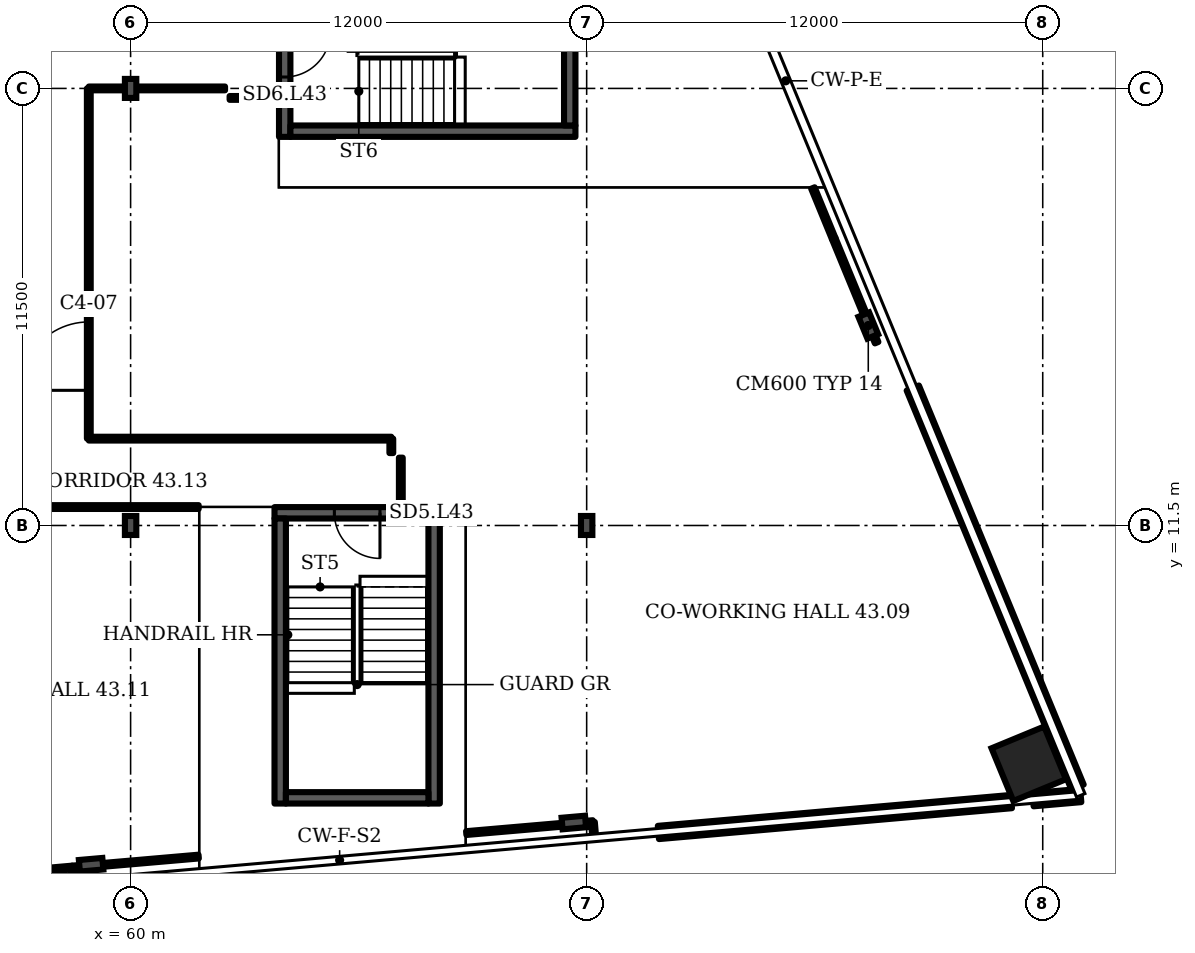
"""IFC4 building model, lengths in metres.
Left out: names, types, materials, properties, quantities, classifications, styles, units other than length and angle.
Written with IfcOpenShell. Run it as: python <this file> out.ifc"""

import sys

from ifc_helpers import new_model, si_unit, direction, frame, frame_2d, origin, origin_2d, place, context, subcontext, project, spatial, rectangle, i_section, extrude, element, fill, save


model = new_model("IFC4")
c1 = context("Model", 3, precision=1e-05, world=origin(), true_north=direction((0.0, 1.0)))
c2 = subcontext(c1, "Body", "Model", "MODEL_VIEW")
j1 = project(units=[si_unit("LENGTHUNIT", "METRE"), si_unit("PLANEANGLEUNIT", "RADIAN")], contexts=[c1])
p1 = place(None, origin())
s1 = spatial("IfcSite", under=j1, at=p1, CompositionType="ELEMENT")
p2 = place(p1, origin())
s2 = spatial("IfcBuilding", under=s1, at=p2, CompositionType="ELEMENT")
p3 = place(p2, frame((0.0, 0.0, 177.1)))
s3 = spatial("IfcBuildingStorey", under=s2, at=p3, CompositionType="ELEMENT", Elevation=177.1)
p4 = place(p3, frame((83.633, 5.231, 0.0), z_axis=(0.0, 0.0, 1.0), x_axis=(-0.381602, 0.924325, 0.0)))
e1 = element("IfcColumn", 1, at=p4, inside=s3, PredefinedType="COLUMN", context=c2, shape_type="SweptSolid", body=[
    extrude(rectangle(XDim=1.5, YDim=1.5, at=origin_2d()), origin(), (0.0, 0.0, 1.0), 3.6),
])
for number, where, z_axis, x_axis in (
    (2, (58.961, 2.573, 0.0), (0.0, 0.0, 1.0), (0.087, -0.996, 0.0)),
    (3, (71.662, 3.685, 0.0), (0.0, 0.0, 1.0), (0.087, -0.996, 0.0)),
    (4, (79.41, 16.762, 0.0), (0.0, 0.0, 1.0), (0.924, 0.382, 0.0)),
):
    element("IfcColumn", number, at=place(p3, frame(where, z_axis=z_axis, x_axis=x_axis)), inside=s3, PredefinedType="COLUMN", context=c2, shape_type="SweptSolid", body=[
        extrude(i_section(OverallWidth=0.305, OverallDepth=0.62, WebThickness=0.021, FlangeThickness=0.04, FilletRadius=0.027, at=origin_2d()), origin(), (0.0, 0.0, 1.0), 3.6),
    ])
for number, where, z_axis, x_axis in (
    (5, (60.0, 11.5, 0.0), (0.0, 0.0, 1.0), (1.0, 0.0, 0.0)),
    (6, (72.0, 11.5, 0.0), (0.0, 0.0, 1.0), (1.0, 0.0, 0.0)),
    (7, (60.0, 23.0, 0.0), (0.0, 0.0, 1.0), (1.0, 0.0, 0.0)),
):
    element("IfcColumn", number, at=place(p3, frame(where, z_axis=z_axis, x_axis=x_axis)), inside=s3, PredefinedType="COLUMN", context=c2, shape_type="SweptSolid", body=[
        extrude(i_section(OverallWidth=0.3, OverallDepth=0.5, WebThickness=0.014, FlangeThickness=0.028, FilletRadius=0.027, at=origin_2d()), origin(), (0.0, 0.0, 1.0), 3.6),
    ])
p5 = place(p3, frame((73.887, 3.423, 0.0), z_axis=(0.0, 0.0, 1.0), x_axis=(0.996197, 0.087145, 0.0)))
e8 = element("IfcWall", 8, at=p5, inside=s3, PredefinedType="SOLIDWALL", context=c2, shape_type="SweptSolid", body=[
    extrude(rectangle(XDim=9.323, YDim=0.35, at=frame_2d((4.662, 0.0))), origin(), (0.0, 0.0, 1.0), 1.0),
])
p6 = place(p3, frame((83.745, 4.285, 0.0), z_axis=(0.0, 0.0, 1.0), x_axis=(0.996198, 0.087148, 0.0)))
e9 = element("IfcWall", 9, at=p6, inside=s3, PredefinedType="SOLIDWALL", context=c2, shape_type="SweptSolid", body=[
    extrude(rectangle(XDim=1.261, YDim=0.35, at=frame_2d((0.63, 0.0))), origin(), (0.0, 0.0, 1.0), 1.0),
])
p7 = place(p3, frame((84.916, 4.616, 0.0), z_axis=(0.0, 0.0, 1.0), x_axis=(-0.381598, 0.924328, 0.0)))
e10 = element("IfcWall", 10, at=p7, inside=s3, PredefinedType="SOLIDWALL", context=c2, shape_type="SweptSolid", body=[
    extrude(rectangle(XDim=11.361, YDim=0.35, at=frame_2d((5.68, 0.0))), origin(), (0.0, 0.0, 1.0), 1.0),
])
p8 = place(p3, frame((63.786, 11.834, 0.0), z_axis=(0.0, 0.0, 1.0), x_axis=(1.0, 0.0, 0.0)))
e11 = element("IfcWall", 11, at=p8, inside=s3, PredefinedType="SHEAR", context=c2, shape_type="SweptSolid", body=[
    extrude(rectangle(XDim=4.35, YDim=0.3, at=frame_2d((2.175, 0.0))), origin(), (0.0, 0.0, 1.0), 3.2),
])
p9 = place(p8, frame((1.575, 0.0, 0.0)))
e12 = element("IfcOpeningElement", 12, at=p9, cuts=e11, PredefinedType="OPENING", context=c2, shape_type="SweptSolid", body=[
    extrude(rectangle(XDim=1.2, YDim=2.1, at=frame_2d((0.6, 1.05))), frame((0.0, 0.16, 0.0), z_axis=(0.0, -1.0, 0.0), x_axis=(1.0, 0.0, 0.0)), (0.0, 0.0, 1.0), 0.32),
])
p10 = place(p3, frame((64.055, 21.725, 0.0), z_axis=(0.0, 0.0, 1.0), x_axis=(0.0, 1.0, 0.0)))
e13 = element("IfcWall", 13, at=p10, inside=s3, PredefinedType="SHEAR", context=c2, shape_type="SweptSolid", body=[
    extrude(rectangle(XDim=4.35, YDim=0.3, at=frame_2d((2.175, 0.0))), origin(), (0.0, 0.0, 1.0), 3.2),
])
p11 = place(p10, frame((1.575, 0.0, 0.0)))
e14 = element("IfcOpeningElement", 14, at=p11, cuts=e13, PredefinedType="OPENING", context=c2, shape_type="SweptSolid", body=[
    extrude(rectangle(XDim=1.2, YDim=2.1, at=frame_2d((0.6, 1.05))), frame((0.0, 0.16, 0.0), z_axis=(0.0, -1.0, 0.0), x_axis=(1.0, 0.0, 0.0)), (0.0, 0.0, 1.0), 0.32),
])
p12 = place(p3, frame((52.5, 1.975, 0.0), z_axis=(0.0, 0.0, 1.0), x_axis=(0.99615, 0.087657, 0.0)))
e15 = element("IfcWall", 15, at=p12, inside=s3, PredefinedType="PARTITIONING", context=c2, shape_type="SweptSolid", body=[
    extrude(rectangle(XDim=5.988, YDim=0.1, at=frame_2d((2.994, 0.0))), origin(), (0.0, 0.0, 1.0), 3.2),
])
p13 = place(p3, frame((57.1, 11.985, 0.0), z_axis=(0.0, 0.0, 1.0), x_axis=(1.0, 0.0, 0.0)))
e16 = element("IfcWall", 16, at=p13, inside=s3, PredefinedType="PARTITIONING", context=c2, shape_type="SweptSolid", body=[
    extrude(rectangle(XDim=4.691, YDim=0.1, at=frame_2d((2.346, 0.0))), origin(), (0.0, 0.0, 1.0), 3.2),
])
p14 = place(p3, frame((58.465, 2.5, 0.0), z_axis=(0.0, 0.0, 1.0), x_axis=(0.996263, 0.086355, 0.0)))
e17 = element("IfcWall", 17, at=p14, inside=s3, PredefinedType="PARTITIONING", context=c2, shape_type="SweptSolid", body=[
    extrude(rectangle(XDim=3.339, YDim=0.1, at=frame_2d((1.669, 0.0))), origin(), (0.0, 0.0, 1.0), 2.58),
])
p15 = place(p3, frame((58.498, 2.102, 0.0), z_axis=(0.0, 0.0, 1.0), x_axis=(-0.083045, 0.996542, 0.0)))
e18 = element("IfcWall", 18, at=p15, inside=s3, PredefinedType="PARTITIONING", context=c2, shape_type="SweptSolid", body=[
    extrude(rectangle(XDim=0.4, YDim=0.1, at=frame_2d((0.2, 0.0))), origin(), (0.0, 0.0, 1.0), 3.2),
])
p16 = place(p3, frame((58.9, 13.785, 0.0), z_axis=(0.0, 0.0, 1.0), x_axis=(0.0, 1.0, 0.0)))
e19 = element("IfcWall", 19, at=p16, inside=s3, PredefinedType="PARTITIONING", context=c2, shape_type="SweptSolid", body=[
    extrude(rectangle(XDim=9.215, YDim=0.1, at=frame_2d((4.607, 0.0))), origin(), (0.0, 0.0, 1.0), 3.2),
])
p17 = place(p16, frame((1.271, 0.0, 0.0)))
e20 = element("IfcOpeningElement", 20, at=p17, cuts=e19, PredefinedType="OPENING", context=c2, shape_type="SweptSolid", body=[
    extrude(rectangle(XDim=1.8, YDim=2.1, at=frame_2d((0.9, 1.05))), frame((0.0, 0.06, 0.0), z_axis=(0.0, -1.0, 0.0), x_axis=(1.0, 0.0, 0.0)), (0.0, 0.0, 1.0), 0.12),
])
p18 = place(p3, frame((58.9, 13.785, 0.0), z_axis=(0.0, 0.0, 1.0), x_axis=(1.0, 0.0, 0.0)))
e21 = element("IfcWall", 21, at=p18, inside=s3, PredefinedType="PARTITIONING", context=c2, shape_type="SweptSolid", body=[
    extrude(rectangle(XDim=7.96, YDim=0.1, at=frame_2d((3.98, 0.0))), origin(), (0.0, 0.0, 1.0), 3.2),
])
p19 = place(p3, frame((58.9, 23.0, 0.0), z_axis=(0.0, 0.0, 1.0), x_axis=(1.0, 0.0, 0.0)))
e22 = element("IfcWall", 22, at=p19, inside=s3, PredefinedType="PARTITIONING", context=c2, shape_type="SweptSolid", body=[
    extrude(rectangle(XDim=3.585, YDim=0.1, at=frame_2d((1.792, 0.0))), origin(), (0.0, 0.0, 1.0), 3.2),
])
p20 = place(p3, frame((62.605, 22.75, 0.0), z_axis=(0.0, 0.0, 1.0), x_axis=(1.0, 0.0, 0.0)))
e23 = element("IfcWall", 23, at=p20, inside=s3, PredefinedType="PARTITIONING", context=c2, shape_type="SweptSolid", body=[
    extrude(rectangle(XDim=1.28, YDim=0.1, at=frame_2d((0.64, 0.0))), origin(), (0.0, 0.0, 1.0), 3.2),
])
p21 = place(p3, frame((66.86, 13.405, 0.0), z_axis=(0.0, 0.0, 1.0), x_axis=(0.0, 1.0, 0.0)))
e24 = element("IfcWall", 24, at=p21, inside=s3, PredefinedType="PARTITIONING", context=c2, shape_type="SweptSolid", body=[
    extrude(rectangle(XDim=0.38, YDim=0.1, at=frame_2d((0.19, 0.0))), origin(), (0.0, 0.0, 1.0), 3.2),
])
p22 = place(p3, frame((67.11, 12.004, 0.0), z_axis=(0.0, 0.0, 1.0), x_axis=(0.0, 1.0, 0.0)))
e25 = element("IfcWall", 25, at=p22, inside=s3, PredefinedType="PARTITIONING", context=c2, shape_type="SweptSolid", body=[
    extrude(rectangle(XDim=1.281, YDim=0.1, at=frame_2d((0.641, 0.0))), origin(), (0.0, 0.0, 1.0), 3.2),
])
p23 = place(p3, frame((68.831, 3.407, 0.0), z_axis=(0.0, 0.0, 1.0), x_axis=(0.996283, 0.086167, 0.0)))
e26 = element("IfcWall", 26, at=p23, inside=s3, PredefinedType="PARTITIONING", context=c2, shape_type="SweptSolid", body=[
    extrude(rectangle(XDim=3.346, YDim=0.1, at=frame_2d((1.673, 0.0))), origin(), (0.0, 0.0, 1.0), 2.58),
])
p24 = place(p3, frame((72.198, 3.3, 0.0), z_axis=(0.0, 0.0, 1.0), x_axis=(-0.083759, 0.996486, 0.0)))
e27 = element("IfcWall", 27, at=p24, inside=s3, PredefinedType="PARTITIONING", context=c2, shape_type="SweptSolid", body=[
    extrude(rectangle(XDim=0.396, YDim=0.1, at=frame_2d((0.198, 0.0))), origin(), (0.0, 0.0, 1.0), 3.2),
])
p25 = place(p3, frame((78.5, 19.05, 0.0), z_axis=(0.0, 0.0, 1.0), x_axis=(-0.380332, 0.924852, 0.0)))
e28 = element("IfcWall", 28, at=p25, inside=s3, PredefinedType="PARTITIONING", context=c2, shape_type="SweptSolid", body=[
    extrude(rectangle(XDim=1.438, YDim=0.1, at=frame_2d((0.719, 0.0))), origin(), (0.0, 0.0, 1.0), 2.58),
])
p26 = place(p3, frame((79.63, 16.31, 0.0), z_axis=(0.0, 0.0, 1.0), x_axis=(-0.381225, 0.924479, 0.0)))
e29 = element("IfcWall", 29, at=p26, inside=s3, PredefinedType="PARTITIONING", context=c2, shape_type="SweptSolid", body=[
    extrude(rectangle(XDim=2.964, YDim=0.1, at=frame_2d((1.482, 0.0))), origin(), (0.0, 0.0, 1.0), 2.58),
])
for number, where, z_axis, x_axis in (
    (30, (63.936, 4.184, 0.0), (0.0, 0.0, 1.0), (0.0, 1.0, 0.0)),
    (31, (67.986, 4.184, 0.0), (0.0, 0.0, 1.0), (0.0, 1.0, 0.0)),
):
    element("IfcWall", number, at=place(p3, frame(where, z_axis=z_axis, x_axis=x_axis)), inside=s3, PredefinedType="SHEAR", context=c2, shape_type="SweptSolid", body=[
        extrude(rectangle(XDim=7.5, YDim=0.3, at=frame_2d((3.75, 0.0))), origin(), (0.0, 0.0, 1.0), 3.2),
    ])
p27 = place(p3, frame((64.086, 4.334, 0.0), z_axis=(0.0, 0.0, 1.0), x_axis=(1.0, 0.0, 0.0)))
e32 = element("IfcWall", 32, at=p27, inside=s3, PredefinedType="SHEAR", context=c2, shape_type="SweptSolid", body=[
    extrude(rectangle(XDim=3.75, YDim=0.3, at=frame_2d((1.875, 0.0))), origin(), (0.0, 0.0, 1.0), 3.2),
])
p28 = place(p3, frame((64.205, 21.875, 0.0), z_axis=(0.0, 0.0, 1.0), x_axis=(1.0, 0.0, 0.0)))
e33 = element("IfcWall", 33, at=p28, inside=s3, PredefinedType="SHEAR", context=c2, shape_type="SweptSolid", body=[
    extrude(rectangle(XDim=7.5, YDim=0.3, at=frame_2d((3.75, 0.0))), origin(), (0.0, 0.0, 1.0), 3.2),
])
p29 = place(p3, frame((71.555, 22.025, 0.0), z_axis=(0.0, 0.0, 1.0), x_axis=(0.0, 1.0, 0.0)))
e34 = element("IfcWall", 34, at=p29, inside=s3, PredefinedType="SHEAR", context=c2, shape_type="SweptSolid", body=[
    extrude(rectangle(XDim=3.75, YDim=0.3, at=frame_2d((1.875, 0.0))), origin(), (0.0, 0.0, 1.0), 3.2),
])
p30 = place(p9, origin())
e35 = element("IfcDoor", 35, at=p30, inside=s3, OperationType="SINGLE_SWING_RIGHT", PredefinedType="DOOR", context=c2, shape_type="SweptSolid", body=[
    extrude(rectangle(XDim=1.2, YDim=2.1, at=frame_2d((0.6, 1.05))), frame((0.0, 0.025, 0.0), z_axis=(0.0, -1.0, 0.0), x_axis=(1.0, 0.0, 0.0)), (0.0, 0.0, 1.0), 0.05),
])
fill(e12, e35)
p31 = place(p11, origin())
e36 = element("IfcDoor", 36, at=p31, inside=s3, OperationType="SINGLE_SWING_RIGHT", PredefinedType="DOOR", context=c2, shape_type="SweptSolid", body=[
    extrude(rectangle(XDim=1.2, YDim=2.1, at=frame_2d((0.6, 1.05))), frame((0.0, 0.025, 0.0), z_axis=(0.0, -1.0, 0.0), x_axis=(1.0, 0.0, 0.0)), (0.0, 0.0, 1.0), 0.05),
])
fill(e14, e36)
p32 = place(p17, origin())
e37 = element("IfcDoor", 37, at=p32, inside=s3, OperationType="DOUBLE_DOOR_SINGLE_SWING", PredefinedType="DOOR", context=c2, shape_type="SweptSolid", body=[
    extrude(rectangle(XDim=1.8, YDim=2.1, at=frame_2d((0.9, 1.05))), frame((0.0, 0.025, 0.0), z_axis=(0.0, -1.0, 0.0), x_axis=(1.0, 0.0, 0.0)), (0.0, 0.0, 1.0), 0.05),
])
fill(e20, e37)
save(model, sys.argv[1])
